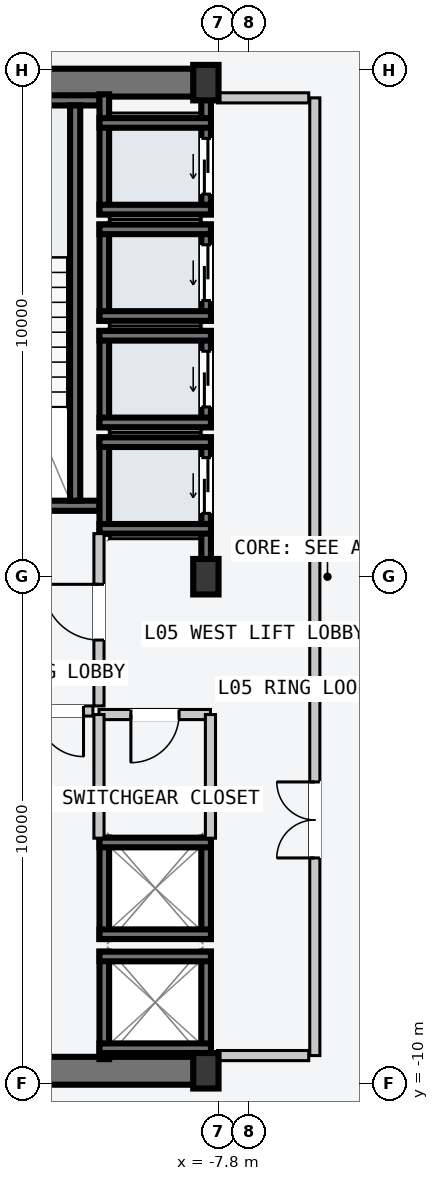
"""IFC4 building model, lengths in metres.
Left out: names, types, materials, properties, quantities, classifications, styles, units other than length and angle.
Written with IfcOpenShell. Run it as: python <this file> out.ifc"""

import sys

from ifc_helpers import new_model, si_unit, direction, frame, frame_2d, origin, origin_2d, place, context, subcontext, project, spatial, rectangle, i_section, extrude, element, fill, save


model = new_model("IFC4")
c1 = context("Model", 3, precision=1e-05, world=origin(), true_north=direction((0.0, 1.0)))
c2 = subcontext(c1, "Body", "Model", "MODEL_VIEW")
j1 = project(units=[si_unit("LENGTHUNIT", "METRE"), si_unit("PLANEANGLEUNIT", "RADIAN")], contexts=[c1])
p1 = place(None, origin())
s1 = spatial("IfcSite", under=j1, at=p1, CompositionType="ELEMENT")
p2 = place(p1, origin())
s2 = spatial("IfcBuilding", under=s1, at=p2, CompositionType="ELEMENT")
p3 = place(p2, frame((0.0, 0.0, 24.0)))
s3 = spatial("IfcBuildingStorey", under=s2, at=p3, CompositionType="ELEMENT", Elevation=24.0)
for number, where, z_axis, x_axis in (
    (1, (-14.53, -9.75, -0.2), (0.0, 0.0, 1.0), (1.0, 0.0, 0.0)),
    (2, (-14.53, 9.75, -0.2), (0.0, 0.0, 1.0), (1.0, 0.0, 0.0)),
):
    element("IfcWall", number, at=place(p3, frame(where, z_axis=z_axis, x_axis=x_axis)), inside=s3, PredefinedType="SHEAR", context=c2, shape_type="SweptSolid", body=[
        extrude(rectangle(XDim=6.46, YDim=0.55, at=frame_2d((3.23, 0.0))), origin(), (0.0, 0.0, 1.0), 3.6),
    ])
p4 = place(p3, frame((-14.25, 1.4, -0.2), z_axis=(0.0, 0.0, 1.0), x_axis=(1.0, 0.0, 0.0)))
e3 = element("IfcWall", 3, at=p4, inside=s3, PredefinedType="SOLIDWALL", context=c2, shape_type="SweptSolid", body=[
    extrude(rectangle(XDim=4.1, YDim=0.2, at=frame_2d((2.05, 0.0))), origin(), (0.0, 0.0, 1.0), 3.6),
])
p5 = place(p4, frame((1.5, 0.0, 0.2)))
e4 = element("IfcOpeningElement", 4, at=p5, cuts=e3, PredefinedType="OPENING", context=c2, shape_type="SweptSolid", body=[
    extrude(rectangle(XDim=1.12, YDim=2.18, at=frame_2d((0.56, 1.09))), frame((0.0, 0.11, 0.0), z_axis=(0.0, -1.0, 0.0), x_axis=(1.0, 0.0, 0.0)), (0.0, 0.0, 1.0), 0.22),
])
p6 = place(p3, frame((-14.25, 9.4, -0.2), z_axis=(0.0, 0.0, 1.0), x_axis=(1.0, 0.0, 0.0)))
e5 = element("IfcWall", 5, at=p6, inside=s3, PredefinedType="SOLIDWALL", context=c2, shape_type="SweptSolid", body=[
    extrude(rectangle(XDim=4.1, YDim=0.2, at=frame_2d((2.05, 0.0))), origin(), (0.0, 0.0, 1.0), 3.6),
])
p7 = place(p3, frame((-10.63, 1.5, -0.2), z_axis=(0.0, 0.0, 1.0), x_axis=(0.0, 1.0, 0.0)))
e6 = element("IfcWall", 6, at=p7, inside=s3, PredefinedType="SOLIDWALL", context=c2, shape_type="SweptSolid", body=[
    extrude(rectangle(XDim=7.8, YDim=0.2, at=frame_2d((3.9, 0.0))), origin(), (0.0, 0.0, 1.0), 3.6),
])
for number, where, z_axis, x_axis in (
    (7, (-8.05, -9.75, 0.0), (0.0, 0.0, 1.0), (1.0, 0.0, 0.0)),
    (8, (-8.05, 0.0, 0.0), (0.0, 0.0, 1.0), (1.0, 0.0, 0.0)),
    (9, (-8.05, 9.75, 0.0), (0.0, 0.0, 1.0), (1.0, 0.0, 0.0)),
):
    element("IfcColumn", number, at=place(p3, frame(where, z_axis=z_axis, x_axis=x_axis)), inside=s3, PredefinedType="COLUMN", context=c2, shape_type="SweptSolid", body=[
        extrude(i_section(OverallWidth=0.5, OverallDepth=0.7, WebThickness=0.028, FlangeThickness=0.045, at=origin_2d()), origin(), (0.0, 0.0, 1.0), 3.6),
    ])
p8 = place(p3, frame((-8.045, 0.21, -0.2), z_axis=(0.0, 0.0, 1.0), x_axis=(0.0, 1.0, 0.0)))
e10 = element("IfcWall", 10, at=p8, inside=s3, PredefinedType="SOLIDWALL", context=c2, shape_type="SweptSolid", body=[
    extrude(rectangle(XDim=2.54, YDim=0.19, at=frame_2d((1.27, 0.0))), origin(), (0.0, 0.0, 1.0), 3.6),
])
p9 = place(p8, frame((1.04, 0.0, 0.2)))
e11 = element("IfcOpeningElement", 11, at=p9, cuts=e10, PredefinedType="OPENING", context=c2, shape_type="SweptSolid", body=[
    extrude(rectangle(XDim=1.1, YDim=2.2, at=frame_2d((0.55, 1.1))), frame((0.0, 0.105, 0.0), z_axis=(0.0, -1.0, 0.0), x_axis=(1.0, 0.0, 0.0)), (0.0, 0.0, 1.0), 0.21),
])
p10 = place(p3, frame((-10.055, 0.85, -0.2), z_axis=(0.0, 0.0, 1.0), x_axis=(0.0, 1.0, 0.0)))
e12 = element("IfcWall", 12, at=p10, inside=s3, PredefinedType="SOLIDWALL", context=c2, shape_type="SweptSolid", body=[
    extrude(rectangle(XDim=1.9, YDim=0.19, at=frame_2d((0.95, 0.0))), origin(), (0.0, 0.0, 1.0), 3.6),
])
for number, where, z_axis, x_axis in (
    (13, (-10.15, 2.655, -0.2), (0.0, 0.0, 1.0), (1.0, 0.0, 0.0)),
    (14, (-10.15, 0.945, -0.2), (0.0, 0.0, 1.0), (1.0, 0.0, 0.0)),
):
    element("IfcWall", number, at=place(p3, frame(where, z_axis=z_axis, x_axis=x_axis)), inside=s3, PredefinedType="SOLIDWALL", context=c2, shape_type="SweptSolid", body=[
        extrude(rectangle(XDim=2.2, YDim=0.19, at=frame_2d((1.1, 0.0))), origin(), (0.0, 0.0, 1.0), 3.6),
    ])
p11 = place(p3, frame((-8.045, 2.95, -0.2), z_axis=(0.0, 0.0, 1.0), x_axis=(0.0, 1.0, 0.0)))
e15 = element("IfcWall", 15, at=p11, inside=s3, PredefinedType="SOLIDWALL", context=c2, shape_type="SweptSolid", body=[
    extrude(rectangle(XDim=1.9, YDim=0.19, at=frame_2d((0.95, 0.0))), origin(), (0.0, 0.0, 1.0), 3.6),
])
p12 = place(p11, frame((0.4, 0.0, 0.2)))
e16 = element("IfcOpeningElement", 16, at=p12, cuts=e15, PredefinedType="OPENING", context=c2, shape_type="SweptSolid", body=[
    extrude(rectangle(XDim=1.1, YDim=2.2, at=frame_2d((0.55, 1.1))), frame((0.0, 0.105, 0.0), z_axis=(0.0, -1.0, 0.0), x_axis=(1.0, 0.0, 0.0)), (0.0, 0.0, 1.0), 0.21),
])
p13 = place(p3, frame((-10.055, 2.95, -0.2), z_axis=(0.0, 0.0, 1.0), x_axis=(0.0, 1.0, 0.0)))
e17 = element("IfcWall", 17, at=p13, inside=s3, PredefinedType="SOLIDWALL", context=c2, shape_type="SweptSolid", body=[
    extrude(rectangle(XDim=1.9, YDim=0.19, at=frame_2d((0.95, 0.0))), origin(), (0.0, 0.0, 1.0), 3.6),
])
for number, where, z_axis, x_axis in (
    (18, (-10.15, 4.755, -0.2), (0.0, 0.0, 1.0), (1.0, 0.0, 0.0)),
    (19, (-10.15, 3.045, -0.2), (0.0, 0.0, 1.0), (1.0, 0.0, 0.0)),
):
    element("IfcWall", number, at=place(p3, frame(where, z_axis=z_axis, x_axis=x_axis)), inside=s3, PredefinedType="SOLIDWALL", context=c2, shape_type="SweptSolid", body=[
        extrude(rectangle(XDim=2.2, YDim=0.19, at=frame_2d((1.1, 0.0))), origin(), (0.0, 0.0, 1.0), 3.6),
    ])
p14 = place(p3, frame((-8.045, 5.05, -0.2), z_axis=(0.0, 0.0, 1.0), x_axis=(0.0, 1.0, 0.0)))
e20 = element("IfcWall", 20, at=p14, inside=s3, PredefinedType="SOLIDWALL", context=c2, shape_type="SweptSolid", body=[
    extrude(rectangle(XDim=1.9, YDim=0.19, at=frame_2d((0.95, 0.0))), origin(), (0.0, 0.0, 1.0), 3.6),
])
p15 = place(p14, frame((0.4, 0.0, 0.2)))
e21 = element("IfcOpeningElement", 21, at=p15, cuts=e20, PredefinedType="OPENING", context=c2, shape_type="SweptSolid", body=[
    extrude(rectangle(XDim=1.1, YDim=2.2, at=frame_2d((0.55, 1.1))), frame((0.0, 0.105, 0.0), z_axis=(0.0, -1.0, 0.0), x_axis=(1.0, 0.0, 0.0)), (0.0, 0.0, 1.0), 0.21),
])
p16 = place(p3, frame((-10.055, 5.05, -0.2), z_axis=(0.0, 0.0, 1.0), x_axis=(0.0, 1.0, 0.0)))
e22 = element("IfcWall", 22, at=p16, inside=s3, PredefinedType="SOLIDWALL", context=c2, shape_type="SweptSolid", body=[
    extrude(rectangle(XDim=1.9, YDim=0.19, at=frame_2d((0.95, 0.0))), origin(), (0.0, 0.0, 1.0), 3.6),
])
for number, where, z_axis, x_axis in (
    (23, (-10.15, 6.855, -0.2), (0.0, 0.0, 1.0), (1.0, 0.0, 0.0)),
    (24, (-10.15, 5.145, -0.2), (0.0, 0.0, 1.0), (1.0, 0.0, 0.0)),
):
    element("IfcWall", number, at=place(p3, frame(where, z_axis=z_axis, x_axis=x_axis)), inside=s3, PredefinedType="SOLIDWALL", context=c2, shape_type="SweptSolid", body=[
        extrude(rectangle(XDim=2.2, YDim=0.19, at=frame_2d((1.1, 0.0))), origin(), (0.0, 0.0, 1.0), 3.6),
    ])
p17 = place(p3, frame((-8.045, 7.15, -0.2), z_axis=(0.0, 0.0, 1.0), x_axis=(0.0, 1.0, 0.0)))
e25 = element("IfcWall", 25, at=p17, inside=s3, PredefinedType="SOLIDWALL", context=c2, shape_type="SweptSolid", body=[
    extrude(rectangle(XDim=2.37, YDim=0.19, at=frame_2d((1.185, 0.0))), origin(), (0.0, 0.0, 1.0), 3.6),
])
p18 = place(p17, frame((0.4, 0.0, 0.2)))
e26 = element("IfcOpeningElement", 26, at=p18, cuts=e25, PredefinedType="OPENING", context=c2, shape_type="SweptSolid", body=[
    extrude(rectangle(XDim=1.1, YDim=2.2, at=frame_2d((0.55, 1.1))), frame((0.0, 0.105, 0.0), z_axis=(0.0, -1.0, 0.0), x_axis=(1.0, 0.0, 0.0)), (0.0, 0.0, 1.0), 0.21),
])
p19 = place(p3, frame((-10.055, 7.15, -0.2), z_axis=(0.0, 0.0, 1.0), x_axis=(0.0, 1.0, 0.0)))
e27 = element("IfcWall", 27, at=p19, inside=s3, PredefinedType="SOLIDWALL", context=c2, shape_type="SweptSolid", body=[
    extrude(rectangle(XDim=2.37, YDim=0.19, at=frame_2d((1.185, 0.0))), origin(), (0.0, 0.0, 1.0), 3.6),
])
for number, where, z_axis, x_axis in (
    (28, (-10.15, 8.955, -0.2), (0.0, 0.0, 1.0), (1.0, 0.0, 0.0)),
    (29, (-10.15, 7.245, -0.2), (0.0, 0.0, 1.0), (1.0, 0.0, 0.0)),
):
    element("IfcWall", number, at=place(p3, frame(where, z_axis=z_axis, x_axis=x_axis)), inside=s3, PredefinedType="SOLIDWALL", context=c2, shape_type="SweptSolid", body=[
        extrude(rectangle(XDim=2.2, YDim=0.19, at=frame_2d((1.1, 0.0))), origin(), (0.0, 0.0, 1.0), 3.6),
    ])
for number, where, z_axis, x_axis in (
    (30, (-8.045, -9.52, -0.2), (0.0, 0.0, 1.0), (0.0, 1.0, 0.0)),
    (31, (-10.055, -9.52, -0.2), (0.0, 0.0, 1.0), (0.0, 1.0, 0.0)),
):
    element("IfcWall", number, at=place(p3, frame(where, z_axis=z_axis, x_axis=x_axis)), inside=s3, PredefinedType="SOLIDWALL", context=c2, shape_type="SweptSolid", body=[
        extrude(rectangle(XDim=2.12, YDim=0.19, at=frame_2d((1.06, 0.0))), origin(), (0.0, 0.0, 1.0), 3.6),
    ])
for number, where, z_axis, x_axis in (
    (32, (-10.15, -7.495, -0.2), (0.0, 0.0, 1.0), (1.0, 0.0, 0.0)),
    (33, (-10.15, -9.305, -0.2), (0.0, 0.0, 1.0), (1.0, 0.0, 0.0)),
):
    element("IfcWall", number, at=place(p3, frame(where, z_axis=z_axis, x_axis=x_axis)), inside=s3, PredefinedType="SOLIDWALL", context=c2, shape_type="SweptSolid", body=[
        extrude(rectangle(XDim=2.2, YDim=0.19, at=frame_2d((1.1, 0.0))), origin(), (0.0, 0.0, 1.0), 3.6),
    ])
for number, where, z_axis, x_axis in (
    (34, (-8.045, -7.15, -0.2), (0.0, 0.0, 1.0), (0.0, 1.0, 0.0)),
    (35, (-10.055, -7.15, -0.2), (0.0, 0.0, 1.0), (0.0, 1.0, 0.0)),
):
    element("IfcWall", number, at=place(p3, frame(where, z_axis=z_axis, x_axis=x_axis)), inside=s3, PredefinedType="SOLIDWALL", context=c2, shape_type="SweptSolid", body=[
        extrude(rectangle(XDim=2.0, YDim=0.19, at=frame_2d((1.0, 0.0))), origin(), (0.0, 0.0, 1.0), 3.6),
    ])
for number, where, z_axis, x_axis in (
    (36, (-10.15, -5.245, -0.2), (0.0, 0.0, 1.0), (1.0, 0.0, 0.0)),
    (37, (-10.15, -7.055, -0.2), (0.0, 0.0, 1.0), (1.0, 0.0, 0.0)),
):
    element("IfcWall", number, at=place(p3, frame(where, z_axis=z_axis, x_axis=x_axis)), inside=s3, PredefinedType="SOLIDWALL", context=c2, shape_type="SweptSolid", body=[
        extrude(rectangle(XDim=2.2, YDim=0.19, at=frame_2d((1.1, 0.0))), origin(), (0.0, 0.0, 1.0), 3.6),
    ])
p20 = place(p3, frame((-5.9, -9.45, 0.0), z_axis=(0.0, 0.0, 1.0), x_axis=(0.0, 1.0, 0.0)))
e38 = element("IfcWall", 38, at=p20, inside=s3, PredefinedType="PARTITIONING", context=c2, shape_type="SweptSolid", body=[
    extrude(rectangle(XDim=18.9, YDim=0.2, at=frame_2d((9.45, 0.0))), origin(), (0.0, 0.0, 1.0), 3.4),
])
p21 = place(p20, frame((3.9, 0.0, 0.0)))
e39 = element("IfcOpeningElement", 39, at=p21, cuts=e38, PredefinedType="OPENING", context=c2, shape_type="SweptSolid", body=[
    extrude(rectangle(XDim=1.5, YDim=2.2, at=frame_2d((0.75, 1.1))), frame((0.0, 0.11, 0.0), z_axis=(0.0, -1.0, 0.0), x_axis=(1.0, 0.0, 0.0)), (0.0, 0.0, 1.0), 0.22),
])
for number, where, z_axis, x_axis in (
    (40, (-6.02, -9.45, 0.0), (0.0, 0.0, 1.0), (-1.0, 0.0, 0.0)),
    (41, (-6.02, 9.45, 0.0), (0.0, 0.0, 1.0), (-1.0, 0.0, 0.0)),
):
    element("IfcWall", number, at=place(p3, frame(where, z_axis=z_axis, x_axis=x_axis)), inside=s3, PredefinedType="PARTITIONING", context=c2, shape_type="SweptSolid", body=[
        extrude(rectangle(XDim=1.8, YDim=0.2, at=frame_2d((0.9, 0.0))), origin(), (0.0, 0.0, 1.0), 3.4),
    ])
p22 = place(p3, frame((-10.16, -2.55, 0.0), z_axis=(0.0, 0.0, 1.0), x_axis=(0.0, 1.0, 0.0)))
e42 = element("IfcWall", 42, at=p22, inside=s3, PredefinedType="PARTITIONING", context=c2, shape_type="SweptSolid", body=[
    extrude(rectangle(XDim=3.4, YDim=0.2, at=frame_2d((1.7, 0.0))), origin(), (0.0, 0.0, 1.0), 3.4),
])
p23 = place(p22, frame((1.3, 0.0, 0.0)))
e43 = element("IfcOpeningElement", 43, at=p23, cuts=e42, PredefinedType="OPENING", context=c2, shape_type="SweptSolid", body=[
    extrude(rectangle(XDim=1.1, YDim=2.15, at=frame_2d((0.55, 1.075))), frame((0.0, 0.11, 0.0), z_axis=(0.0, -1.0, 0.0), x_axis=(1.0, 0.0, 0.0)), (0.0, 0.0, 1.0), 0.22),
])
p24 = place(p3, frame((-10.28, -2.65, 0.0), z_axis=(0.0, 0.0, 1.0), x_axis=(-1.0, 0.0, 0.0)))
e44 = element("IfcWall", 44, at=p24, inside=s3, PredefinedType="PARTITIONING", context=c2, shape_type="SweptSolid", body=[
    extrude(rectangle(XDim=1.27, YDim=0.2, at=frame_2d((0.635, 0.0))), origin(), (0.0, 0.0, 1.0), 3.4),
])
p25 = place(p24, frame((0.185, 0.0, 0.0)))
e45 = element("IfcOpeningElement", 45, at=p25, cuts=e44, PredefinedType="OPENING", context=c2, shape_type="SweptSolid", body=[
    extrude(rectangle(XDim=0.9, YDim=2.15, at=frame_2d((0.45, 1.075))), frame((0.0, 0.11, 0.0), z_axis=(0.0, -1.0, 0.0), x_axis=(1.0, 0.0, 0.0)), (0.0, 0.0, 1.0), 0.22),
])
p26 = place(p3, frame((-7.96, -2.72, 0.0), z_axis=(0.0, 0.0, 1.0), x_axis=(-1.0, 0.0, 0.0)))
e46 = element("IfcWall", 46, at=p26, inside=s3, PredefinedType="PARTITIONING", context=c2, shape_type="SweptSolid", body=[
    extrude(rectangle(XDim=2.2, YDim=0.2, at=frame_2d((1.1, 0.0))), origin(), (0.0, 0.0, 1.0), 3.4),
])
p27 = place(p26, frame((0.62, 0.0, 0.0)))
e47 = element("IfcOpeningElement", 47, at=p27, cuts=e46, PredefinedType="OPENING", context=c2, shape_type="SweptSolid", body=[
    extrude(rectangle(XDim=0.95, YDim=2.1, at=frame_2d((0.475, 1.05))), frame((0.0, 0.11, 0.0), z_axis=(0.0, -1.0, 0.0), x_axis=(1.0, 0.0, 0.0)), (0.0, 0.0, 1.0), 0.22),
])
for number, where, z_axis, x_axis in (
    (48, (-7.96, -5.16, 0.0), (0.0, 0.0, 1.0), (0.0, 1.0, 0.0)),
    (49, (-10.16, -5.16, 0.0), (0.0, 0.0, 1.0), (0.0, 1.0, 0.0)),
):
    element("IfcWall", number, at=place(p3, frame(where, z_axis=z_axis, x_axis=x_axis)), inside=s3, PredefinedType="PARTITIONING", context=c2, shape_type="SweptSolid", body=[
        extrude(rectangle(XDim=2.44, YDim=0.2, at=frame_2d((1.22, 0.0))), origin(), (0.0, 0.0, 1.0), 3.4),
    ])
p28 = place(p9, origin())
e50 = element("IfcDoor", 50, at=p28, inside=s3, OperationType="SLIDING_TO_LEFT", PredefinedType="DOOR", context=c2, shape_type="SweptSolid", body=[
    extrude(rectangle(XDim=1.1, YDim=2.2, at=frame_2d((0.55, 1.1))), frame((0.0, 0.025, 0.0), z_axis=(0.0, -1.0, 0.0), x_axis=(1.0, 0.0, 0.0)), (0.0, 0.0, 1.0), 0.05),
])
fill(e11, e50)
p29 = place(p12, origin())
e51 = element("IfcDoor", 51, at=p29, inside=s3, OperationType="SLIDING_TO_LEFT", PredefinedType="DOOR", context=c2, shape_type="SweptSolid", body=[
    extrude(rectangle(XDim=1.1, YDim=2.2, at=frame_2d((0.55, 1.1))), frame((0.0, 0.025, 0.0), z_axis=(0.0, -1.0, 0.0), x_axis=(1.0, 0.0, 0.0)), (0.0, 0.0, 1.0), 0.05),
])
fill(e16, e51)
p30 = place(p15, origin())
e52 = element("IfcDoor", 52, at=p30, inside=s3, OperationType="SLIDING_TO_LEFT", PredefinedType="DOOR", context=c2, shape_type="SweptSolid", body=[
    extrude(rectangle(XDim=1.1, YDim=2.2, at=frame_2d((0.55, 1.1))), frame((0.0, 0.025, 0.0), z_axis=(0.0, -1.0, 0.0), x_axis=(1.0, 0.0, 0.0)), (0.0, 0.0, 1.0), 0.05),
])
fill(e21, e52)
p31 = place(p18, origin())
e53 = element("IfcDoor", 53, at=p31, inside=s3, OperationType="SLIDING_TO_LEFT", PredefinedType="DOOR", context=c2, shape_type="SweptSolid", body=[
    extrude(rectangle(XDim=1.1, YDim=2.2, at=frame_2d((0.55, 1.1))), frame((0.0, 0.025, 0.0), z_axis=(0.0, -1.0, 0.0), x_axis=(1.0, 0.0, 0.0)), (0.0, 0.0, 1.0), 0.05),
])
fill(e26, e53)
p32 = place(p21, origin())
e54 = element("IfcDoor", 54, at=p32, inside=s3, OperationType="DOUBLE_DOOR_SINGLE_SWING", PredefinedType="DOOR", context=c2, shape_type="SweptSolid", body=[
    extrude(rectangle(XDim=1.5, YDim=2.2, at=frame_2d((0.75, 1.1))), frame((0.0, 0.025, 0.0), z_axis=(0.0, -1.0, 0.0), x_axis=(1.0, 0.0, 0.0)), (0.0, 0.0, 1.0), 0.05),
])
fill(e39, e54)
p33 = place(p23, origin())
e55 = element("IfcDoor", 55, at=p33, inside=s3, OperationType="SINGLE_SWING_RIGHT", PredefinedType="DOOR", context=c2, shape_type="SweptSolid", body=[
    extrude(rectangle(XDim=1.1, YDim=2.15, at=frame_2d((0.55, 1.075))), frame((0.0, 0.025, 0.0), z_axis=(0.0, -1.0, 0.0), x_axis=(1.0, 0.0, 0.0)), (0.0, 0.0, 1.0), 0.05),
])
fill(e43, e55)
p34 = place(p25, origin())
e56 = element("IfcDoor", 56, at=p34, inside=s3, OperationType="SINGLE_SWING_LEFT", PredefinedType="DOOR", context=c2, shape_type="SweptSolid", body=[
    extrude(rectangle(XDim=0.9, YDim=2.15, at=frame_2d((0.45, 1.075))), frame((0.0, 0.025, 0.0), z_axis=(0.0, -1.0, 0.0), x_axis=(1.0, 0.0, 0.0)), (0.0, 0.0, 1.0), 0.05),
])
fill(e45, e56)
p35 = place(p27, origin())
e57 = element("IfcDoor", 57, at=p35, inside=s3, OperationType="SINGLE_SWING_RIGHT", PredefinedType="DOOR", context=c2, shape_type="SweptSolid", body=[
    extrude(rectangle(XDim=0.95, YDim=2.1, at=frame_2d((0.475, 1.05))), frame((0.0, 0.025, 0.0), z_axis=(0.0, -1.0, 0.0), x_axis=(1.0, 0.0, 0.0)), (0.0, 0.0, 1.0), 0.05),
])
fill(e47, e57)
save(model, sys.argv[1])
